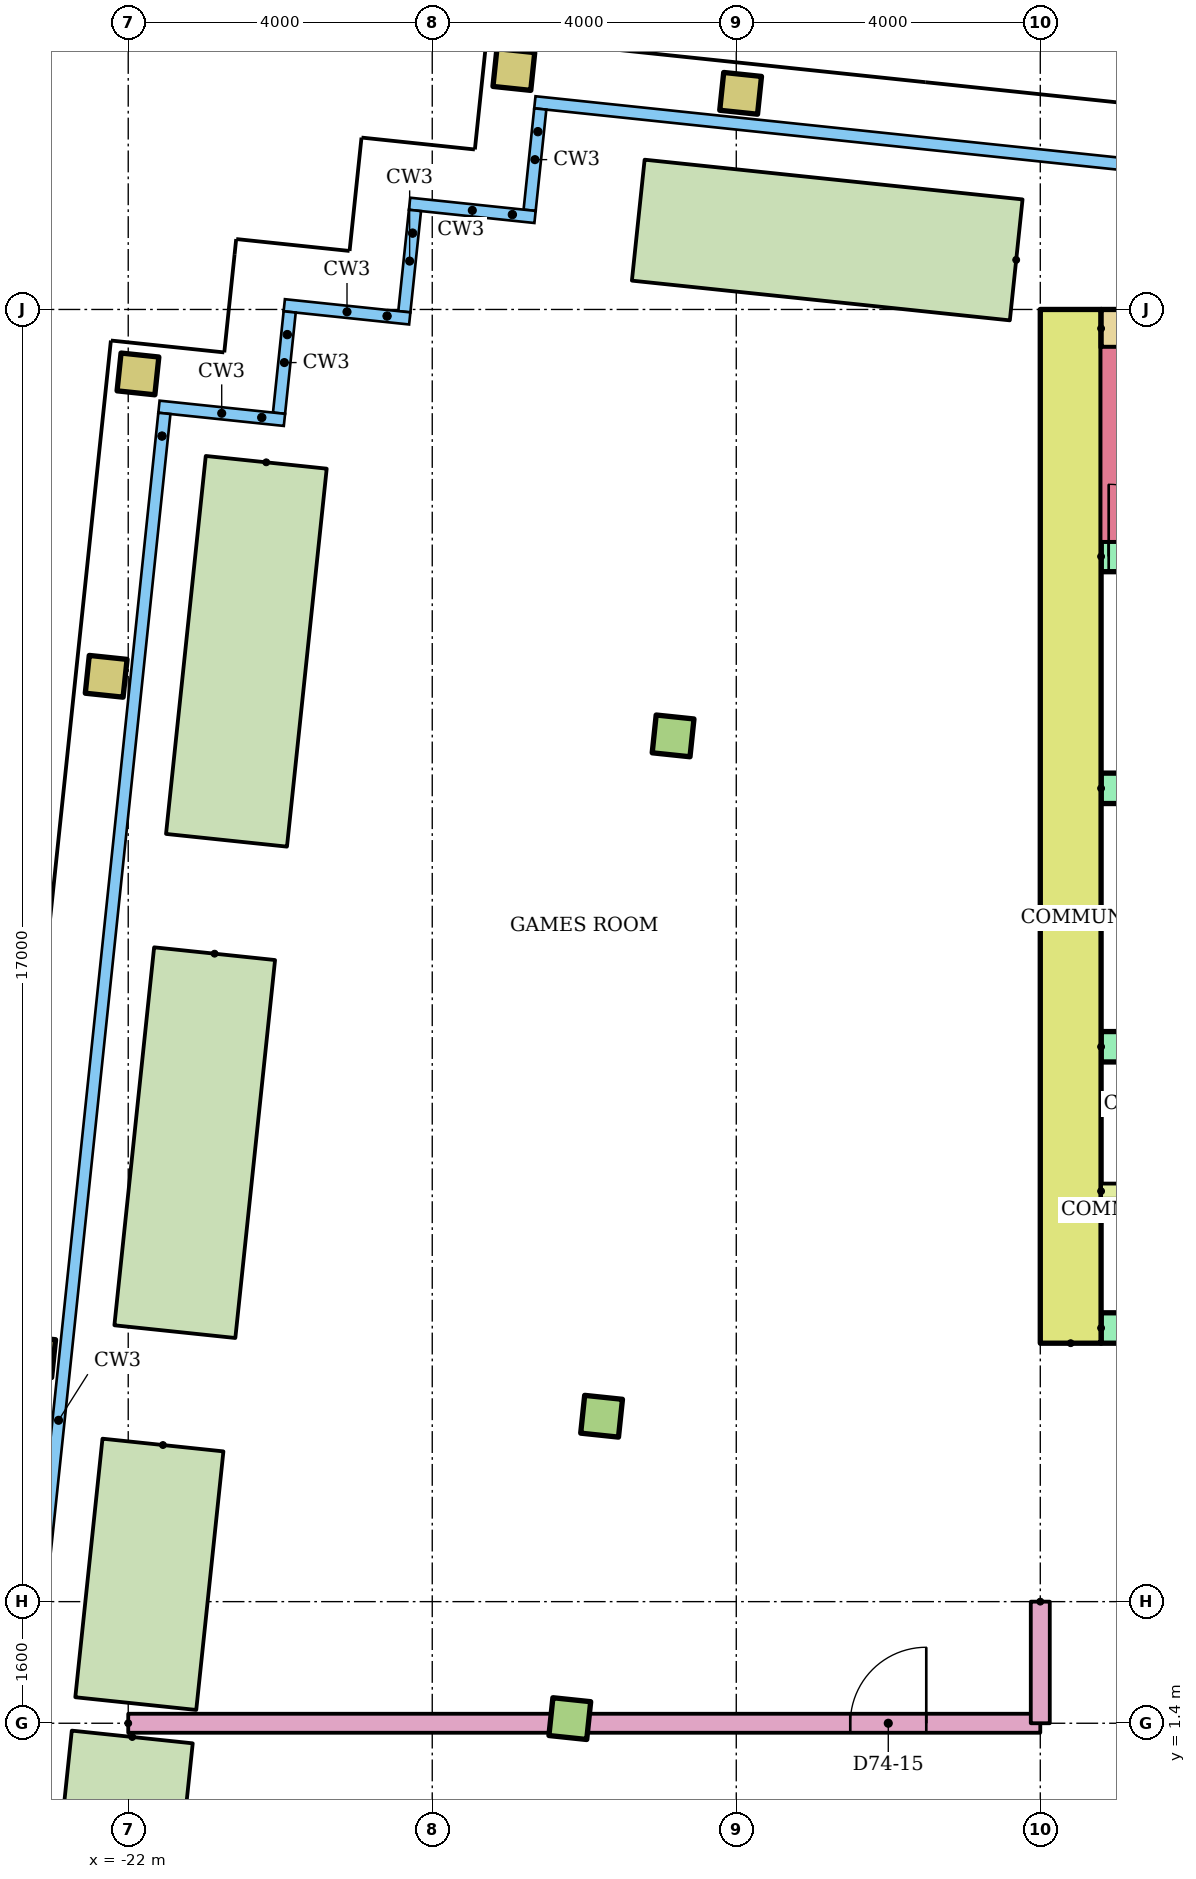
"""IFC4 building model, lengths in metres.
Left out: names, types, materials, properties, quantities, classifications, styles, units other than length and angle.
Written with IfcOpenShell. Run it as: python <this file> out.ifc"""

import sys

from ifc_helpers import new_model, si_unit, direction, frame, frame_2d, origin, origin_2d, place, context, subcontext, project, spatial, rectangle, hollow_rectangle, extrude, element, fill, save


model = new_model("IFC4")
c1 = context("Model", 3, precision=1e-05, world=origin(), true_north=direction((0.0, 1.0)))
c2 = subcontext(c1, "Body", "Model", "MODEL_VIEW")
j1 = project(units=[si_unit("LENGTHUNIT", "METRE"), si_unit("PLANEANGLEUNIT", "RADIAN")], contexts=[c1])
p1 = place(None, origin())
s1 = spatial("IfcSite", under=j1, at=p1, CompositionType="ELEMENT")
p2 = place(p1, origin())
s2 = spatial("IfcBuilding", under=s1, at=p2, CompositionType="ELEMENT")
p3 = place(p2, frame((0.0, 0.0, 281.9)))
s3 = spatial("IfcBuildingStorey", under=s2, at=p3, CompositionType="ELEMENT", Elevation=281.9)
p4 = place(p3, frame((-16.19, 1.461, 0.0), z_axis=(0.0, 0.0, 1.0), x_axis=(0.994521895368, -0.104528463268, 0.0)))
e1 = element("IfcColumn", 1, at=p4, inside=s3, PredefinedType="COLUMN", context=c2, shape_type="SweptSolid", body=[
    extrude(rectangle(XDim=0.5, YDim=0.5, at=origin_2d()), origin(), (0.0, 0.0, 1.0), 9.6),
])
p5 = place(p3, frame((-23.231, 6.223, 0.0), z_axis=(0.0, 0.0, 1.0), x_axis=(0.994521895368, -0.104528463268, 0.0)))
e2 = element("IfcColumn", 2, at=p5, inside=s3, PredefinedType="COLUMN", context=c2, shape_type="SweptSolid", body=[
    extrude(hollow_rectangle(XDim=0.5, YDim=0.5, WallThickness=0.025, at=origin_2d()), origin(), (0.0, 0.0, 1.0), 9.6),
])
p6 = place(p3, frame((-15.772, 5.439, 0.0), z_axis=(0.0, 0.0, 1.0), x_axis=(0.994521895368, -0.104528463268, 0.0)))
e3 = element("IfcColumn", 3, at=p6, inside=s3, PredefinedType="COLUMN", context=c2, shape_type="SweptSolid", body=[
    extrude(rectangle(XDim=0.5, YDim=0.5, at=origin_2d()), origin(), (0.0, 0.0, 1.0), 9.6),
])
p7 = place(p3, frame((-22.29, 15.174, 0.0), z_axis=(0.0, 0.0, 1.0), x_axis=(0.994521895368, -0.104528463268, 0.0)))
e4 = element("IfcColumn", 4, at=p7, inside=s3, PredefinedType="COLUMN", context=c2, shape_type="SweptSolid", body=[
    extrude(hollow_rectangle(XDim=0.5, YDim=0.5, WallThickness=0.025, at=origin_2d()), origin(), (0.0, 0.0, 1.0), 9.6),
])
p8 = place(p3, frame((-14.831, 14.39, 0.0), z_axis=(0.0, 0.0, 1.0), x_axis=(0.994521895368, -0.104528463268, 0.0)))
e5 = element("IfcColumn", 5, at=p8, inside=s3, PredefinedType="COLUMN", context=c2, shape_type="SweptSolid", body=[
    extrude(rectangle(XDim=0.5, YDim=0.5, at=origin_2d()), origin(), (0.0, 0.0, 1.0), 9.6),
])
for number, where, z_axis, x_axis in (
    (6, (-21.872, 19.152, 0.0), (0.0, 0.0, 1.0), (0.995, -0.105, 0.0)),
    (7, (-16.926, 23.157, 0.0), (0.0, 0.0, 1.0), (0.995, -0.105, 0.0)),
    (8, (-13.943, 22.843, 0.0), (0.0, 0.0, 1.0), (0.995, -0.105, 0.0)),
):
    element("IfcColumn", number, at=place(p3, frame(where, z_axis=z_axis, x_axis=x_axis)), inside=s3, PredefinedType="COLUMN", context=c2, shape_type="SweptSolid", body=[
        extrude(hollow_rectangle(XDim=0.5, YDim=0.5, WallThickness=0.025, at=origin_2d()), origin(), (0.0, 0.0, 1.0), 9.6),
    ])
p9 = place(p3, frame((-10.317, 20.652, 0.0), z_axis=(0.0, 0.0, 1.0), x_axis=(-0.994525767953, 0.104491611519, 0.0)))
e9 = element("IfcWall", 9, at=p9, inside=s3, PredefinedType="STANDARD", context=c2, shape_type="SweptSolid", body=[
    extrude(rectangle(XDim=5.0, YDim=1.6, at=frame_2d((2.5, 0.0))), origin(), (0.0, 0.0, 1.0), 0.8),
])
p10 = place(p3, frame((-20.184, 17.989, 0.0), z_axis=(0.0, 0.0, 1.0), x_axis=(-0.104544982588, -0.994520158979, 0.0)))
e10 = element("IfcWall", 10, at=p10, inside=s3, PredefinedType="STANDARD", context=c2, shape_type="SweptSolid", body=[
    extrude(rectangle(XDim=5.0, YDim=1.6, at=frame_2d((2.5, 0.0))), origin(), (0.0, 0.0, 1.0), 0.8),
])
p11 = place(p3, frame((-20.864, 11.525, 0.0), z_axis=(0.0, 0.0, 1.0), x_axis=(-0.104539905878, -0.994520692635, 0.0)))
e11 = element("IfcWall", 11, at=p11, inside=s3, PredefinedType="STANDARD", context=c2, shape_type="SweptSolid", body=[
    extrude(rectangle(XDim=5.0, YDim=1.6, at=frame_2d((2.5, 0.0))), origin(), (0.0, 0.0, 1.0), 0.8),
])
p12 = place(p3, frame((-9.6, 6.4, 0.0), z_axis=(0.0, 0.0, 1.0), x_axis=(0.0, 1.0, 0.0)))
e12 = element("IfcWall", 12, at=p12, inside=s3, PredefinedType="SHEAR", context=c2, shape_type="SweptSolid", body=[
    extrude(rectangle(XDim=13.6, YDim=0.8, at=frame_2d((6.8, 0.0))), origin(), (0.0, 0.0, 1.0), 9.32),
])
p13 = place(p3, frame((-9.2, 19.75, 0.0)))
e13 = element("IfcWall", 13, at=p13, inside=s3, PredefinedType="SHEAR", context=c2, shape_type="SweptSolid", body=[
    extrude(rectangle(XDim=18.4, YDim=0.5, at=frame_2d((9.2, 0.0))), origin(), (0.0, 0.0, 1.0), 9.32),
])
p14 = place(p3, frame((-9.2, 6.6, 0.0)))
e14 = element("IfcWall", 14, at=p14, inside=s3, PredefinedType="SHEAR", context=c2, shape_type="SweptSolid", body=[
    extrude(rectangle(XDim=18.4, YDim=0.4, at=frame_2d((9.2, 0.0))), origin(), (0.0, 0.0, 1.0), 9.32),
])
p15 = place(p14, frame((8.3, 0.0, 0.0)))
e15 = element("IfcOpeningElement", 15, at=p15, cuts=e14, PredefinedType="OPENING", context=c2, shape_type="SweptSolid", body=[
    extrude(rectangle(XDim=1.8, YDim=2.1, at=frame_2d((0.9, 1.05))), frame((0.0, 0.21, 0.0), z_axis=(0.0, -1.0, 0.0), x_axis=(1.0, 0.0, 0.0)), (0.0, 0.0, 1.0), 0.42),
])
p16 = place(p14, frame((3.8, 0.0, 0.0)))
e16 = element("IfcOpeningElement", 16, at=p16, cuts=e14, PredefinedType="OPENING", context=c2, shape_type="SweptSolid", body=[
    extrude(rectangle(XDim=1.8, YDim=2.1, at=frame_2d((0.9, 1.05))), frame((0.0, 0.21, 0.0), z_axis=(0.0, -1.0, 0.0), x_axis=(1.0, 0.0, 0.0)), (0.0, 0.0, 1.0), 0.42),
])
p17 = place(p14, frame((12.8, 0.0, 0.0)))
e17 = element("IfcOpeningElement", 17, at=p17, cuts=e14, PredefinedType="OPENING", context=c2, shape_type="SweptSolid", body=[
    extrude(rectangle(XDim=1.8, YDim=2.1, at=frame_2d((0.9, 1.05))), frame((0.0, 0.21, 0.0), z_axis=(0.0, -1.0, 0.0), x_axis=(1.0, 0.0, 0.0)), (0.0, 0.0, 1.0), 0.42),
])
p18 = place(p3, frame((-9.2, 10.3, 0.0)))
e18 = element("IfcWall", 18, at=p18, inside=s3, PredefinedType="SHEAR", context=c2, shape_type="SweptSolid", body=[
    extrude(rectangle(XDim=8.0, YDim=0.4, at=frame_2d((4.0, 0.0))), origin(), (0.0, 0.0, 1.0), 9.32),
])
p19 = place(p18, frame((3.35, 0.0, 0.0)))
e19 = element("IfcOpeningElement", 19, at=p19, cuts=e18, PredefinedType="OPENING", context=c2, shape_type="SweptSolid", body=[
    extrude(rectangle(XDim=1.1, YDim=2.1, at=frame_2d((0.55, 1.05))), frame((0.0, 0.21, 0.0), z_axis=(0.0, -1.0, 0.0), x_axis=(1.0, 0.0, 0.0)), (0.0, 0.0, 1.0), 0.42),
])
p20 = place(p18, frame((6.083, 0.0, 0.0)))
e20 = element("IfcOpeningElement", 20, at=p20, cuts=e18, PredefinedType="OPENING", context=c2, shape_type="SweptSolid", body=[
    extrude(rectangle(XDim=1.1, YDim=2.1, at=frame_2d((0.55, 1.05))), frame((0.0, 0.21, 0.0), z_axis=(0.0, -1.0, 0.0), x_axis=(1.0, 0.0, 0.0)), (0.0, 0.0, 1.0), 0.42),
])
p21 = place(p18, frame((0.917, 0.0, 0.0)))
e21 = element("IfcOpeningElement", 21, at=p21, cuts=e18, PredefinedType="OPENING", context=c2, shape_type="SweptSolid", body=[
    extrude(rectangle(XDim=1.0, YDim=2.1, at=frame_2d((0.5, 1.05))), frame((0.0, 0.21, 0.0), z_axis=(0.0, -1.0, 0.0), x_axis=(1.0, 0.0, 0.0)), (0.0, 0.0, 1.0), 0.42),
])
p22 = place(p3, frame((-9.2, 13.7, 0.0)))
e22 = element("IfcWall", 22, at=p22, inside=s3, PredefinedType="SHEAR", context=c2, shape_type="SweptSolid", body=[
    extrude(rectangle(XDim=8.0, YDim=0.4, at=frame_2d((4.0, 0.0))), origin(), (0.0, 0.0, 1.0), 9.32),
])
p23 = place(p3, frame((-9.2, 16.75, 0.0)))
e23 = element("IfcWall", 23, at=p23, inside=s3, PredefinedType="SHEAR", context=c2, shape_type="SweptSolid", body=[
    extrude(rectangle(XDim=18.4, YDim=0.4, at=frame_2d((9.2, 0.0))), origin(), (0.0, 0.0, 1.0), 9.32),
])
p24 = place(p23, frame((0.1, 0.0, 0.0)))
e24 = element("IfcOpeningElement", 24, at=p24, cuts=e23, PredefinedType="OPENING", context=c2, shape_type="SweptSolid", body=[
    extrude(rectangle(XDim=0.95, YDim=2.1, at=frame_2d((0.475, 1.05))), frame((0.0, 0.21, 0.0), z_axis=(0.0, -1.0, 0.0), x_axis=(1.0, 0.0, 0.0)), (0.0, 0.0, 1.0), 0.42),
])
p25 = place(p23, frame((6.1, 0.0, 0.0)))
e25 = element("IfcOpeningElement", 25, at=p25, cuts=e23, PredefinedType="OPENING", context=c2, shape_type="SweptSolid", body=[
    extrude(rectangle(XDim=0.95, YDim=2.1, at=frame_2d((0.475, 1.05))), frame((0.0, 0.21, 0.0), z_axis=(0.0, -1.0, 0.0), x_axis=(1.0, 0.0, 0.0)), (0.0, 0.0, 1.0), 0.42),
])
p26 = place(p23, frame((12.1, 0.0, 0.0)))
e26 = element("IfcOpeningElement", 26, at=p26, cuts=e23, PredefinedType="OPENING", context=c2, shape_type="SweptSolid", body=[
    extrude(rectangle(XDim=0.95, YDim=2.1, at=frame_2d((0.475, 1.05))), frame((0.0, 0.21, 0.0), z_axis=(0.0, -1.0, 0.0), x_axis=(1.0, 0.0, 0.0)), (0.0, 0.0, 1.0), 0.42),
])
p27 = place(p3, frame((-9.2, 8.4, 0.0)))
e27 = element("IfcWall", 27, at=p27, inside=s3, PredefinedType="PARTITIONING", context=c2, shape_type="SweptSolid", body=[
    extrude(rectangle(XDim=3.4, YDim=0.2, at=frame_2d((1.7, 0.0))), origin(), (0.0, 0.0, 1.0), 9.32),
])
p28 = place(p3, frame((-22.0, 1.4, 0.0)))
e28 = element("IfcWall", 28, at=p28, inside=s3, PredefinedType="PARTITIONING", context=c2, shape_type="SweptSolid", body=[
    extrude(rectangle(XDim=12.0, YDim=0.25, at=frame_2d((6.0, 0.0))), origin(), (0.0, 0.0, 1.0), 8.8),
])
p29 = place(p28, frame((9.5, 0.0, 0.0)))
e29 = element("IfcOpeningElement", 29, at=p29, cuts=e28, PredefinedType="OPENING", context=c2, shape_type="SweptSolid", body=[
    extrude(rectangle(XDim=1.0, YDim=2.1, at=frame_2d((0.5, 1.05))), frame((0.0, 0.135, 0.0), z_axis=(0.0, -1.0, 0.0), x_axis=(1.0, 0.0, 0.0)), (0.0, 0.0, 1.0), 0.27),
])
p30 = place(p3, frame((-10.0, 3.0, 0.0), z_axis=(0.0, 0.0, 1.0), x_axis=(0.0, -1.0, 0.0)))
e30 = element("IfcWall", 30, at=p30, inside=s3, PredefinedType="PARTITIONING", context=c2, shape_type="SweptSolid", body=[
    extrude(rectangle(XDim=1.6, YDim=0.25, at=frame_2d((0.8, 0.0))), origin(), (0.0, 0.0, 1.0), 8.8),
])
p31 = place(p3, frame((-21.543, 5.06, 0.0), z_axis=(0.0, 0.0, 1.0), x_axis=(-0.104499001474, -0.994524991486, 0.0)))
e31 = element("IfcWall", 31, at=p31, inside=s3, PredefinedType="STANDARD", context=c2, shape_type="SweptSolid", body=[
    extrude(rectangle(XDim=3.42, YDim=1.6, at=frame_2d((1.71, 0.0))), origin(), (0.0, 0.0, 1.0), 0.8),
])
p32 = place(p3, frame((-21.947, 1.219, 0.0), z_axis=(0.0, 0.0, 1.0), x_axis=(-0.104472610257, -0.994527764171, 0.0)))
e32 = element("IfcWall", 32, at=p32, inside=s3, PredefinedType="STANDARD", context=c2, shape_type="SweptSolid", body=[
    extrude(rectangle(XDim=1.138, YDim=1.6, at=frame_2d((0.569, 0.0))), origin(), (0.0, 0.0, 1.0), 0.8),
])
p33 = place(p24, origin())
e33 = element("IfcDoor", 33, at=p33, inside=s3, OperationType="SINGLE_SWING_LEFT", PredefinedType="DOOR", context=c2, shape_type="SweptSolid", body=[
    extrude(rectangle(XDim=0.95, YDim=2.1, at=frame_2d((0.475, 1.05))), frame((0.0, 0.025, 0.0), z_axis=(0.0, -1.0, 0.0), x_axis=(1.0, 0.0, 0.0)), (0.0, 0.0, 1.0), 0.05),
])
fill(e24, e33)
p34 = place(p29, origin())
e34 = element("IfcDoor", 34, at=p34, inside=s3, OperationType="SINGLE_SWING_RIGHT", PredefinedType="DOOR", context=c2, shape_type="SweptSolid", body=[
    extrude(rectangle(XDim=1.0, YDim=2.1, at=frame_2d((0.5, 1.05))), frame((0.0, 0.025, 0.0), z_axis=(0.0, -1.0, 0.0), x_axis=(1.0, 0.0, 0.0)), (0.0, 0.0, 1.0), 0.05),
])
fill(e29, e34)
save(model, sys.argv[1])
